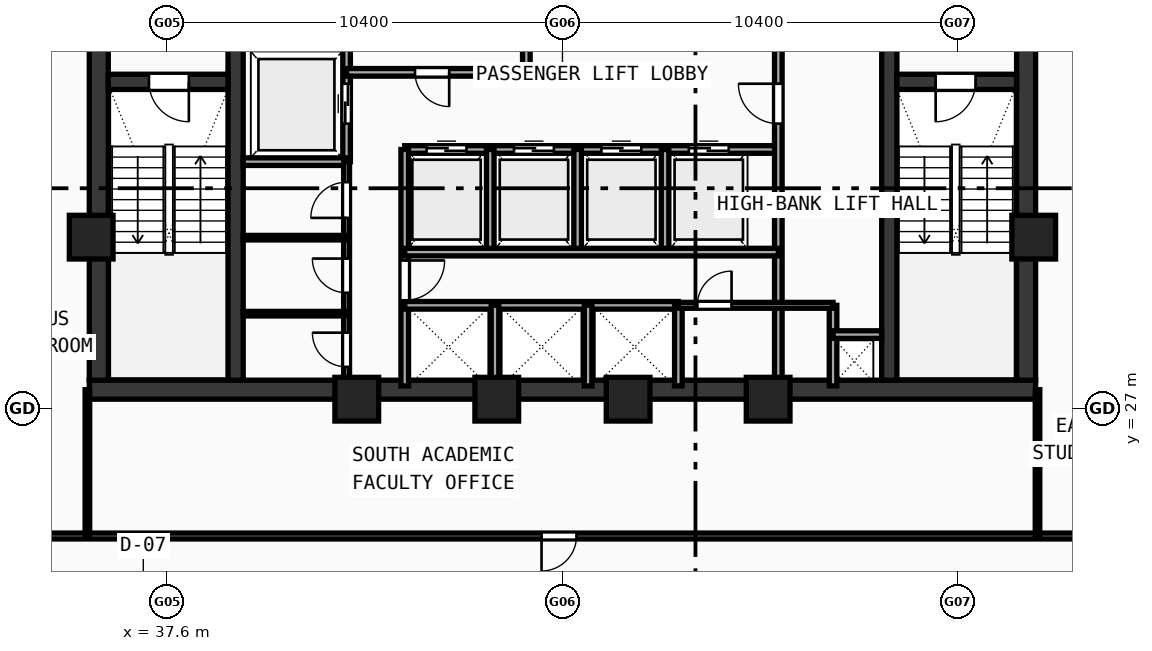
"""IFC4 building model, lengths in metres.
Left out: names, types, materials, properties, quantities, classifications, styles, units other than length and angle.
Written with IfcOpenShell. Run it as: python <this file> out.ifc"""

import sys

from ifc_helpers import new_model, si_unit, direction, frame, frame_2d, origin, origin_with_axes, origin_2d, place, context, subcontext, project, spatial, rectangle, hollow_rectangle, extrude, source, transform, mapped, element, fill, save


model = new_model("IFC4")
c1 = context("Model", 3, precision=1e-05, world=origin(), true_north=direction((0.0, 1.0)))
c2 = subcontext(c1, "Body", "Model", "MODEL_VIEW")
j1 = project(units=[si_unit("LENGTHUNIT", "METRE"), si_unit("PLANEANGLEUNIT", "RADIAN")], contexts=[c1])
p1 = place(None, origin())
s1 = spatial("IfcSite", under=j1, at=p1, CompositionType="ELEMENT")
p2 = place(p1, origin())
s2 = spatial("IfcBuilding", under=s1, at=p2, CompositionType="ELEMENT")
p3 = place(p2, frame((0.0, 0.0, 192.36)))
s3 = spatial("IfcBuildingStorey", under=s2, at=p3, CompositionType="ELEMENT", Elevation=192.36)
p4 = place(p3, frame((35.55, 27.5, 0.0), z_axis=(0.0, 0.0, 1.0), x_axis=(1.0, 0.0, 0.0)))
e1 = element("IfcWall", 1, at=p4, inside=s3, PredefinedType="SHEAR", context=c2, shape_type="SweptSolid", body=[
    extrude(rectangle(XDim=24.9, YDim=0.5, at=frame_2d((12.45, 0.0))), origin(), (0.0, 0.0, 1.0), 3.54),
])
for number, where, z_axis, x_axis in (
    (2, (35.8, 27.75, 0.0), (0.0, 0.0, 1.0), (0.0, 1.0, 0.0)),
    (3, (60.2, 27.75, 0.0), (0.0, 0.0, 1.0), (0.0, 1.0, 0.0)),
):
    element("IfcWall", number, at=place(p3, frame(where, z_axis=z_axis, x_axis=x_axis)), inside=s3, PredefinedType="SHEAR", context=c2, shape_type="SweptSolid", body=[
        extrude(rectangle(XDim=12.2, YDim=0.5, at=frame_2d((6.1, 0.0))), origin(), (0.0, 0.0, 1.0), 3.54),
    ])
p5 = place(p3, frame((39.4, 27.75, 0.0), z_axis=(0.0, 0.0, 1.0), x_axis=(0.0, 1.0, 0.0)))
e4 = element("IfcWall", 4, at=p5, inside=s3, PredefinedType="SHEAR", context=c2, shape_type="SweptSolid", body=[
    extrude(rectangle(XDim=12.2, YDim=0.4, at=frame_2d((6.1, 0.0))), origin(), (0.0, 0.0, 1.0), 3.54),
])
p6 = place(p5, frame((10.0, 0.0, 0.0)))
e5 = element("IfcOpeningElement", 5, at=p6, cuts=e4, PredefinedType="OPENING", context=c2, shape_type="SweptSolid", body=[
    extrude(rectangle(XDim=1.1, YDim=2.1, at=frame_2d((0.55, 1.05))), frame((0.0, 0.21, 0.0), z_axis=(0.0, -1.0, 0.0), x_axis=(1.0, 0.0, 0.0)), (0.0, 0.0, 1.0), 0.42),
])
p7 = place(p3, frame((56.6, 27.75, 0.0), z_axis=(0.0, 0.0, 1.0), x_axis=(0.0, 1.0, 0.0)))
e6 = element("IfcWall", 6, at=p7, inside=s3, PredefinedType="SHEAR", context=c2, shape_type="SweptSolid", body=[
    extrude(rectangle(XDim=12.2, YDim=0.4, at=frame_2d((6.1, 0.0))), origin(), (0.0, 0.0, 1.0), 3.54),
])
p8 = place(p7, frame((10.0, 0.0, 0.0)))
e7 = element("IfcOpeningElement", 7, at=p8, cuts=e6, PredefinedType="OPENING", context=c2, shape_type="SweptSolid", body=[
    extrude(rectangle(XDim=1.1, YDim=2.1, at=frame_2d((0.55, 1.05))), frame((0.0, 0.21, 0.0), z_axis=(0.0, -1.0, 0.0), x_axis=(1.0, 0.0, 0.0)), (0.0, 0.0, 1.0), 0.42),
])
p9 = place(p3, frame((36.05, 35.6, 0.0), z_axis=(0.0, 0.0, 1.0), x_axis=(1.0, 0.0, 0.0)))
e8 = element("IfcWall", 8, at=p9, inside=s3, PredefinedType="SHEAR", context=c2, shape_type="SweptSolid", body=[
    extrude(rectangle(XDim=3.15, YDim=0.4, at=frame_2d((1.575, 0.0))), origin(), (0.0, 0.0, 1.0), 3.54),
])
p10 = place(p9, frame((1.07, 0.0, 0.0)))
e9 = element("IfcOpeningElement", 9, at=p10, cuts=e8, PredefinedType="OPENING", context=c2, shape_type="SweptSolid", body=[
    extrude(rectangle(XDim=1.05, YDim=2.1, at=frame_2d((0.525, 1.05))), frame((0.0, 0.21, 0.0), z_axis=(0.0, -1.0, 0.0), x_axis=(1.0, 0.0, 0.0)), (0.0, 0.0, 1.0), 0.42),
])
p11 = place(p3, frame((56.8, 35.6, 0.0), z_axis=(0.0, 0.0, 1.0), x_axis=(1.0, 0.0, 0.0)))
e10 = element("IfcWall", 10, at=p11, inside=s3, PredefinedType="SHEAR", context=c2, shape_type="SweptSolid", body=[
    extrude(rectangle(XDim=3.15, YDim=0.4, at=frame_2d((1.575, 0.0))), origin(), (0.0, 0.0, 1.0), 3.54),
])
p12 = place(p11, frame((1.02, 0.0, 0.0)))
e11 = element("IfcOpeningElement", 11, at=p12, cuts=e10, PredefinedType="OPENING", context=c2, shape_type="SweptSolid", body=[
    extrude(rectangle(XDim=1.05, YDim=2.1, at=frame_2d((0.525, 1.05))), frame((0.0, 0.21, 0.0), z_axis=(0.0, -1.0, 0.0), x_axis=(1.0, 0.0, 0.0)), (0.0, 0.0, 1.0), 0.42),
])
m1 = source(origin(), c2, "Body", "SweptSolid", [
    extrude(hollow_rectangle(XDim=1.15, YDim=1.15, WallThickness=0.048, at=origin_2d()), origin(), (0.0, 0.0, 1.0), 3.8),
])
for number, where, z_axis, x_axis in (
    (12, (42.588, 27.25, -0.26), (0.0, 0.0, 1.0), (1.0, 0.0, 0.0)),
    (13, (46.272, 27.25, -0.26), (0.0, 0.0, 1.0), (1.0, 0.0, 0.0)),
    (14, (49.729, 27.25, -0.26), (0.0, 0.0, 1.0), (1.0, 0.0, 0.0)),
    (15, (53.412, 27.25, -0.26), (0.0, 0.0, 1.0), (1.0, 0.0, 0.0)),
    (16, (60.4, 31.513, -0.26), (0.0, 0.0, 1.0), (1.0, 0.0, 0.0)),
    (17, (35.6, 31.513, -0.26), (0.0, 0.0, 1.0), (1.0, 0.0, 0.0)),
):
    element("IfcColumn", number, at=place(p3, frame(where, z_axis=z_axis, x_axis=x_axis)), inside=s3, PredefinedType="COLUMN", context=c2, shape_type="MappedRepresentation", body=[
        mapped(m1, transform((0.0, 0.0, 0.0), scale=1.0)),
    ])
p13 = place(p3, frame((42.32, 33.5, 0.0), z_axis=(0.0, 0.0, 1.0), x_axis=(0.0, 1.0, 0.0)))
e18 = element("IfcWall", 18, at=p13, inside=s3, PredefinedType="SOLIDWALL", context=c2, shape_type="SweptSolid", body=[
    extrude(rectangle(XDim=6.45, YDim=0.2, at=frame_2d((3.225, 0.0))), origin(), (0.0, 0.0, 1.0), 3.54),
])
p14 = place(p13, frame((1.0, 0.0, 0.0)))
e19 = element("IfcOpeningElement", 19, at=p14, cuts=e18, PredefinedType="OPENING", context=c2, shape_type="SweptSolid", body=[
    extrude(rectangle(XDim=1.05, YDim=2.1, at=frame_2d((0.525, 1.05))), frame((0.0, 0.11, 0.0), z_axis=(0.0, -1.0, 0.0), x_axis=(1.0, 0.0, 0.0)), (0.0, 0.0, 1.0), 0.22),
])
p15 = place(p3, frame((39.6, 33.5, 0.0), z_axis=(0.0, 0.0, 1.0), x_axis=(1.0, 0.0, 0.0)))
e20 = element("IfcWall", 20, at=p15, inside=s3, PredefinedType="SOLIDWALL", context=c2, shape_type="SweptSolid", body=[
    extrude(rectangle(XDim=2.72, YDim=0.2, at=frame_2d((1.36, 0.0))), origin(), (0.0, 0.0, 1.0), 3.54),
])
p16 = place(p3, frame((42.32, 35.85, 0.0), z_axis=(0.0, 0.0, 1.0), x_axis=(1.0, 0.0, 0.0)))
e21 = element("IfcWall", 21, at=p16, inside=s3, PredefinedType="SOLIDWALL", context=c2, shape_type="SweptSolid", body=[
    extrude(rectangle(XDim=4.73, YDim=0.2, at=frame_2d((2.365, 0.0))), origin(), (0.0, 0.0, 1.0), 3.54),
])
p17 = place(p16, frame((1.8, 0.0, 0.0)))
e22 = element("IfcOpeningElement", 22, at=p17, cuts=e21, PredefinedType="OPENING", context=c2, shape_type="SweptSolid", body=[
    extrude(rectangle(XDim=0.9, YDim=2.1, at=frame_2d((0.45, 1.05))), frame((0.0, 0.11, 0.0), z_axis=(0.0, -1.0, 0.0), x_axis=(1.0, 0.0, 0.0)), (0.0, 0.0, 1.0), 0.22),
])
p18 = place(p3, frame((47.05, 35.85, 0.0), z_axis=(0.0, 0.0, 1.0), x_axis=(0.0, 1.0, 0.0)))
e23 = element("IfcWall", 23, at=p18, inside=s3, PredefinedType="SOLIDWALL", context=c2, shape_type="SweptSolid", body=[
    extrude(rectangle(XDim=4.1, YDim=0.2, at=frame_2d((2.05, 0.0))), origin(), (0.0, 0.0, 1.0), 3.54),
])
p19 = place(p3, frame((43.85, 33.82, 0.0), z_axis=(0.0, 0.0, 1.0), x_axis=(1.0, 0.0, 0.0)))
e24 = element("IfcWall", 24, at=p19, inside=s3, PredefinedType="SOLIDWALL", context=c2, shape_type="SweptSolid", body=[
    extrude(rectangle(XDim=9.83, YDim=0.2, at=frame_2d((4.915, 0.0))), origin(), (0.0, 0.0, 1.0), 3.54),
])
p20 = place(p19, frame((0.575, 0.0, 0.0)))
e25 = element("IfcOpeningElement", 25, at=p20, cuts=e24, PredefinedType="OPENING", context=c2, shape_type="SweptSolid", body=[
    extrude(rectangle(XDim=1.05, YDim=2.1, at=frame_2d((0.525, 1.05))), frame((0.0, 0.11, 0.0), z_axis=(0.0, -1.0, 0.0), x_axis=(1.0, 0.0, 0.0)), (0.0, 0.0, 1.0), 0.22),
])
p21 = place(p19, frame((2.875, 0.0, 0.0)))
e26 = element("IfcOpeningElement", 26, at=p21, cuts=e24, PredefinedType="OPENING", context=c2, shape_type="SweptSolid", body=[
    extrude(rectangle(XDim=1.05, YDim=2.1, at=frame_2d((0.525, 1.05))), frame((0.0, 0.11, 0.0), z_axis=(0.0, -1.0, 0.0), x_axis=(1.0, 0.0, 0.0)), (0.0, 0.0, 1.0), 0.22),
])
p22 = place(p19, frame((5.175, 0.0, 0.0)))
e27 = element("IfcOpeningElement", 27, at=p22, cuts=e24, PredefinedType="OPENING", context=c2, shape_type="SweptSolid", body=[
    extrude(rectangle(XDim=1.05, YDim=2.1, at=frame_2d((0.525, 1.05))), frame((0.0, 0.11, 0.0), z_axis=(0.0, -1.0, 0.0), x_axis=(1.0, 0.0, 0.0)), (0.0, 0.0, 1.0), 0.22),
])
p23 = place(p19, frame((7.475, 0.0, 0.0)))
e28 = element("IfcOpeningElement", 28, at=p23, cuts=e24, PredefinedType="OPENING", context=c2, shape_type="SweptSolid", body=[
    extrude(rectangle(XDim=1.05, YDim=2.1, at=frame_2d((0.525, 1.05))), frame((0.0, 0.11, 0.0), z_axis=(0.0, -1.0, 0.0), x_axis=(1.0, 0.0, 0.0)), (0.0, 0.0, 1.0), 0.22),
])
p24 = place(p3, frame((43.85, 27.6, 0.0), z_axis=(0.0, 0.0, 1.0), x_axis=(0.0, 1.0, 0.0)))
e29 = element("IfcWall", 29, at=p24, inside=s3, PredefinedType="SOLIDWALL", context=c2, shape_type="SweptSolid", body=[
    extrude(rectangle(XDim=6.22, YDim=0.2, at=frame_2d((3.11, 0.0))), origin(), (0.0, 0.0, 1.0), 3.54),
])
p25 = place(p24, frame((2.25, 0.0, 0.0)))
e30 = element("IfcOpeningElement", 30, at=p25, cuts=e29, PredefinedType="OPENING", context=c2, shape_type="SweptSolid", body=[
    extrude(rectangle(XDim=1.05, YDim=2.1, at=frame_2d((0.525, 1.05))), frame((0.0, 0.11, 0.0), z_axis=(0.0, -1.0, 0.0), x_axis=(1.0, 0.0, 0.0)), (0.0, 0.0, 1.0), 0.22),
])
p26 = place(p3, frame((53.68, 27.6, 0.0), z_axis=(0.0, 0.0, 1.0), x_axis=(0.0, 1.0, 0.0)))
e31 = element("IfcWall", 31, at=p26, inside=s3, PredefinedType="SOLIDWALL", context=c2, shape_type="SweptSolid", body=[
    extrude(rectangle(XDim=9.05, YDim=0.2, at=frame_2d((4.525, 0.0))), origin(), (0.0, 0.0, 1.0), 3.54),
])
p27 = place(p26, frame((6.9, 0.0, 0.0)))
e32 = element("IfcOpeningElement", 32, at=p27, cuts=e31, PredefinedType="OPENING", context=c2, shape_type="SweptSolid", body=[
    extrude(rectangle(XDim=1.05, YDim=2.1, at=frame_2d((0.525, 1.05))), frame((0.0, 0.11, 0.0), z_axis=(0.0, -1.0, 0.0), x_axis=(1.0, 0.0, 0.0)), (0.0, 0.0, 1.0), 0.22),
])
for number, where, z_axis, x_axis in (
    (33, (46.1, 31.12, 0.0), (0.0, 0.0, 1.0), (0.0, 1.0, 0.0)),
    (34, (48.4, 31.12, 0.0), (0.0, 0.0, 1.0), (0.0, 1.0, 0.0)),
    (35, (50.7, 31.12, 0.0), (0.0, 0.0, 1.0), (0.0, 1.0, 0.0)),
):
    element("IfcWall", number, at=place(p3, frame(where, z_axis=z_axis, x_axis=x_axis)), inside=s3, PredefinedType="SOLIDWALL", context=c2, shape_type="SweptSolid", body=[
        extrude(rectangle(XDim=2.7, YDim=0.2, at=frame_2d((1.35, 0.0))), origin(), (0.0, 0.0, 1.0), 3.54),
    ])
p28 = place(p3, frame((43.85, 29.72, 0.0), z_axis=(0.0, 0.0, 1.0), x_axis=(1.0, 0.0, 0.0)))
e36 = element("IfcWall", 36, at=p28, inside=s3, PredefinedType="SOLIDWALL", context=c2, shape_type="SweptSolid", body=[
    extrude(rectangle(XDim=7.2, YDim=0.2, at=frame_2d((3.6, 0.0))), origin(), (0.0, 0.0, 1.0), 3.54),
])
p29 = place(p3, frame((51.05, 27.6, 0.0), z_axis=(0.0, 0.0, 1.0), x_axis=(0.0, 1.0, 0.0)))
e37 = element("IfcWall", 37, at=p29, inside=s3, PredefinedType="SOLIDWALL", context=c2, shape_type="SweptSolid", body=[
    extrude(rectangle(XDim=2.12, YDim=0.2, at=frame_2d((1.06, 0.0))), origin(), (0.0, 0.0, 1.0), 3.54),
])
p30 = place(p3, frame((43.85, 31.12, 0.0), z_axis=(0.0, 0.0, 1.0), x_axis=(1.0, 0.0, 0.0)))
e38 = element("IfcWall", 38, at=p30, inside=s3, PredefinedType="SOLIDWALL", context=c2, shape_type="SweptSolid", body=[
    extrude(rectangle(XDim=9.83, YDim=0.2, at=frame_2d((4.915, 0.0))), origin(), (0.0, 0.0, 1.0), 3.54),
])
for number, where, z_axis, x_axis in (
    (39, (46.225, 27.6, 0.0), (0.0, 0.0, 1.0), (0.0, 1.0, 0.0)),
    (40, (48.675, 27.6, 0.0), (0.0, 0.0, 1.0), (0.0, 1.0, 0.0)),
    (41, (55.12, 27.6, 0.0), (0.0, 0.0, 1.0), (0.0, 1.0, 0.0)),
):
    element("IfcWall", number, at=place(p3, frame(where, z_axis=z_axis, x_axis=x_axis)), inside=s3, PredefinedType="SOLIDWALL", context=c2, shape_type="SweptSolid", body=[
        extrude(rectangle(XDim=2.12, YDim=0.2, at=frame_2d((1.06, 0.0))), origin(), (0.0, 0.0, 1.0), 3.54),
    ])
p31 = place(p3, frame((55.12, 28.95, 0.0), z_axis=(0.0, 0.0, 1.0), x_axis=(1.0, 0.0, 0.0)))
e42 = element("IfcWall", 42, at=p31, inside=s3, PredefinedType="SOLIDWALL", context=c2, shape_type="SweptSolid", body=[
    extrude(rectangle(XDim=1.28, YDim=0.2, at=frame_2d((0.64, 0.0))), origin(), (0.0, 0.0, 1.0), 3.54),
])
p32 = place(p3, frame((42.32, 27.6, 0.0), z_axis=(0.0, 0.0, 1.0), x_axis=(0.0, 1.0, 0.0)))
e43 = element("IfcWall", 43, at=p32, inside=s3, PredefinedType="PARTITIONING", context=c2, shape_type="SweptSolid", body=[
    extrude(rectangle(XDim=5.9, YDim=0.155, at=frame_2d((2.95, 0.0))), origin(), (0.0, 0.0, 1.0), 3.54),
])
p33 = place(p32, frame((0.5, 0.0, 0.0)))
e44 = element("IfcOpeningElement", 44, at=p33, cuts=e43, PredefinedType="OPENING", context=c2, shape_type="SweptSolid", body=[
    extrude(rectangle(XDim=0.9, YDim=2.1, at=frame_2d((0.45, 1.05))), frame((0.0, 0.087, 0.0), z_axis=(0.0, -1.0, 0.0), x_axis=(1.0, 0.0, 0.0)), (0.0, 0.0, 1.0), 0.175),
])
p34 = place(p32, frame((2.45, 0.0, 0.0)))
e45 = element("IfcOpeningElement", 45, at=p34, cuts=e43, PredefinedType="OPENING", context=c2, shape_type="SweptSolid", body=[
    extrude(rectangle(XDim=0.9, YDim=2.1, at=frame_2d((0.45, 1.05))), frame((0.0, 0.087, 0.0), z_axis=(0.0, -1.0, 0.0), x_axis=(1.0, 0.0, 0.0)), (0.0, 0.0, 1.0), 0.175),
])
p35 = place(p32, frame((4.42, 0.0, 0.0)))
e46 = element("IfcOpeningElement", 46, at=p35, cuts=e43, PredefinedType="OPENING", context=c2, shape_type="SweptSolid", body=[
    extrude(rectangle(XDim=0.94, YDim=2.1, at=frame_2d((0.47, 1.05))), frame((0.0, 0.087, 0.0), z_axis=(0.0, -1.0, 0.0), x_axis=(1.0, 0.0, 0.0)), (0.0, 0.0, 1.0), 0.175),
])
p36 = place(p3, frame((51.05, 29.72, 0.0), z_axis=(0.0, 0.0, 1.0), x_axis=(1.0, 0.0, 0.0)))
e47 = element("IfcWall", 47, at=p36, inside=s3, PredefinedType="PARTITIONING", context=c2, shape_type="SweptSolid", body=[
    extrude(rectangle(XDim=4.07, YDim=0.155, at=frame_2d((2.035, 0.0))), origin(), (0.0, 0.0, 1.0), 3.54),
])
p37 = place(p36, frame((0.5, 0.0, 0.0)))
e48 = element("IfcOpeningElement", 48, at=p37, cuts=e47, PredefinedType="OPENING", context=c2, shape_type="SweptSolid", body=[
    extrude(rectangle(XDim=0.9, YDim=2.1, at=frame_2d((0.45, 1.05))), frame((0.0, 0.087, 0.0), z_axis=(0.0, -1.0, 0.0), x_axis=(1.0, 0.0, 0.0)), (0.0, 0.0, 1.0), 0.175),
])
for number, where, z_axis, x_axis in (
    (49, (39.6, 29.5, 0.0), (0.0, 0.0, 1.0), (1.0, 0.0, 0.0)),
    (50, (39.6, 31.5, 0.0), (0.0, 0.0, 1.0), (1.0, 0.0, 0.0)),
):
    element("IfcWall", number, at=place(p3, frame(where, z_axis=z_axis, x_axis=x_axis)), inside=s3, PredefinedType="PARTITIONING", context=c2, shape_type="SweptSolid", body=[
        extrude(rectangle(XDim=2.72, YDim=0.12, at=frame_2d((1.36, 0.0))), origin(), (0.0, 0.0, 1.0), 3.54),
    ])
p38 = place(p3, frame((31.45, 23.65, 0.0), z_axis=(0.0, 0.0, 1.0), x_axis=(1.0, 0.0, 0.0)))
e51 = element("IfcWall", 51, at=p38, inside=s3, PredefinedType="PARTITIONING", context=c2, shape_type="SweptSolid", body=[
    extrude(rectangle(XDim=33.1, YDim=0.155, at=frame_2d((16.55, 0.0))), origin(), (0.0, 0.0, 1.0), 2.89),
])
p39 = place(p38, frame((16.0, 0.0, 0.0)))
e52 = element("IfcOpeningElement", 52, at=p39, cuts=e51, PredefinedType="OPENING", context=c2, shape_type="SweptSolid", body=[
    extrude(rectangle(XDim=0.92, YDim=2.1, at=frame_2d((0.46, 1.05))), frame((0.0, 0.087, 0.0), z_axis=(0.0, -1.0, 0.0), x_axis=(1.0, 0.0, 0.0)), (0.0, 0.0, 1.0), 0.175),
])
for number, where, z_axis, x_axis in (
    (53, (35.5, 23.65, 0.0), (0.0, 0.0, 1.0), (0.0, 1.0, 0.0)),
    (54, (60.5, 23.65, 0.0), (0.0, 0.0, 1.0), (0.0, 1.0, 0.0)),
):
    element("IfcWall", number, at=place(p3, frame(where, z_axis=z_axis, x_axis=x_axis)), inside=s3, PredefinedType="PARTITIONING", context=c2, shape_type="SweptSolid", body=[
        extrude(rectangle(XDim=3.85, YDim=0.12, at=frame_2d((1.925, 0.0))), origin(), (0.0, 0.0, 1.0), 3.14),
    ])
m2 = source(origin(), c2, "Body", "SweptSolid", [
    extrude(rectangle(XDim=1.05, YDim=2.1, at=frame_2d((0.525, 1.05))), frame((0.0, 0.025, 0.0), z_axis=(0.0, -1.0, 0.0), x_axis=(1.0, 0.0, 0.0)), (0.0, 0.0, 1.0), 0.05),
])
p40 = place(p10, frame((1.05, 0.0, 0.0), z_axis=(0.0, 0.0, 1.0), x_axis=(-1.0, 0.0, 0.0)))
e55 = element("IfcDoor", 55, at=p40, inside=s3, OperationType="SINGLE_SWING_LEFT", PredefinedType="DOOR", context=c2, shape_type="MappedRepresentation", body=[
    mapped(m2, transform((0.0, 0.0, 0.0), scale=1.0)),
])
fill(e9, e55)
p41 = place(p12, frame((1.05, 0.0, 0.0), z_axis=(0.0, 0.0, 1.0), x_axis=(-1.0, 0.0, 0.0)))
e56 = element("IfcDoor", 56, at=p41, inside=s3, OperationType="SINGLE_SWING_RIGHT", PredefinedType="DOOR", context=c2, shape_type="MappedRepresentation", body=[
    mapped(m2, transform((0.0, 0.0, 0.0), scale=1.0)),
])
fill(e11, e56)
p42 = place(p14, origin_with_axes())
e57 = element("IfcDoor", 57, at=p42, inside=s3, OperationType="DOUBLE_DOOR_SLIDING", PredefinedType="DOOR", context=c2, shape_type="MappedRepresentation", body=[
    mapped(m2, transform((0.0, 0.0, 0.0), scale=1.0)),
])
fill(e19, e57)
m3 = source(origin(), c2, "Body", "SweptSolid", [
    extrude(rectangle(XDim=0.9, YDim=2.1, at=frame_2d((0.45, 1.05))), frame((0.0, 0.025, 0.0), z_axis=(0.0, -1.0, 0.0), x_axis=(1.0, 0.0, 0.0)), (0.0, 0.0, 1.0), 0.05),
])
p43 = place(p17, frame((0.9, 0.0, 0.0), z_axis=(0.0, 0.0, 1.0), x_axis=(-1.0, 0.0, 0.0)))
e58 = element("IfcDoor", 58, at=p43, inside=s3, OperationType="SINGLE_SWING_LEFT", PredefinedType="DOOR", context=c2, shape_type="MappedRepresentation", body=[
    mapped(m3, transform((0.0, 0.0, 0.0), scale=1.0)),
])
fill(e22, e58)
p44 = place(p20, origin_with_axes())
e59 = element("IfcDoor", 59, at=p44, inside=s3, OperationType="DOUBLE_DOOR_SLIDING", PredefinedType="DOOR", context=c2, shape_type="MappedRepresentation", body=[
    mapped(m2, transform((0.0, 0.0, 0.0), scale=1.0)),
])
fill(e25, e59)
p45 = place(p21, origin_with_axes())
e60 = element("IfcDoor", 60, at=p45, inside=s3, OperationType="DOUBLE_DOOR_SLIDING", PredefinedType="DOOR", context=c2, shape_type="MappedRepresentation", body=[
    mapped(m2, transform((0.0, 0.0, 0.0), scale=1.0)),
])
fill(e26, e60)
p46 = place(p22, origin_with_axes())
e61 = element("IfcDoor", 61, at=p46, inside=s3, OperationType="DOUBLE_DOOR_SLIDING", PredefinedType="DOOR", context=c2, shape_type="MappedRepresentation", body=[
    mapped(m2, transform((0.0, 0.0, 0.0), scale=1.0)),
])
fill(e27, e61)
p47 = place(p23, origin_with_axes())
e62 = element("IfcDoor", 62, at=p47, inside=s3, OperationType="DOUBLE_DOOR_SLIDING", PredefinedType="DOOR", context=c2, shape_type="MappedRepresentation", body=[
    mapped(m2, transform((0.0, 0.0, 0.0), scale=1.0)),
])
fill(e28, e62)
p48 = place(p25, frame((1.05, 0.0, 0.0), z_axis=(0.0, 0.0, 1.0), x_axis=(-1.0, 0.0, 0.0)))
e63 = element("IfcDoor", 63, at=p48, inside=s3, OperationType="SINGLE_SWING_LEFT", PredefinedType="DOOR", context=c2, shape_type="MappedRepresentation", body=[
    mapped(m2, transform((0.0, 0.0, 0.0), scale=1.0)),
])
fill(e30, e63)
p49 = place(p27, origin_with_axes())
e64 = element("IfcDoor", 64, at=p49, inside=s3, OperationType="SINGLE_SWING_RIGHT", PredefinedType="DOOR", context=c2, shape_type="MappedRepresentation", body=[
    mapped(m2, transform((0.0, 0.0, 0.0), scale=1.0)),
])
fill(e32, e64)
p50 = place(p33, origin_with_axes())
e65 = element("IfcDoor", 65, at=p50, inside=s3, OperationType="SINGLE_SWING_RIGHT", PredefinedType="DOOR", context=c2, shape_type="MappedRepresentation", body=[
    mapped(m3, transform((0.0, 0.0, 0.0), scale=1.0)),
])
fill(e44, e65)
p51 = place(p34, origin_with_axes())
e66 = element("IfcDoor", 66, at=p51, inside=s3, OperationType="SINGLE_SWING_RIGHT", PredefinedType="DOOR", context=c2, shape_type="MappedRepresentation", body=[
    mapped(m3, transform((0.0, 0.0, 0.0), scale=1.0)),
])
fill(e45, e66)
m4 = source(origin(), c2, "Body", "SweptSolid", [
    extrude(rectangle(XDim=0.94, YDim=2.1, at=frame_2d((0.47, 1.05))), frame((0.0, 0.025, 0.0), z_axis=(0.0, -1.0, 0.0), x_axis=(1.0, 0.0, 0.0)), (0.0, 0.0, 1.0), 0.05),
])
p52 = place(p35, origin_with_axes())
e67 = element("IfcDoor", 67, at=p52, inside=s3, OperationType="SINGLE_SWING_LEFT", PredefinedType="DOOR", context=c2, shape_type="MappedRepresentation", body=[
    mapped(m4, transform((0.0, 0.0, 0.0), scale=1.0)),
])
fill(e46, e67)
p53 = place(p37, origin_with_axes())
e68 = element("IfcDoor", 68, at=p53, inside=s3, OperationType="SINGLE_SWING_RIGHT", PredefinedType="DOOR", context=c2, shape_type="MappedRepresentation", body=[
    mapped(m3, transform((0.0, 0.0, 0.0), scale=1.0)),
])
fill(e48, e68)
m5 = source(origin(), c2, "Body", "SweptSolid", [
    extrude(rectangle(XDim=0.92, YDim=2.1, at=frame_2d((0.46, 1.05))), frame((0.0, 0.025, 0.0), z_axis=(0.0, -1.0, 0.0), x_axis=(1.0, 0.0, 0.0)), (0.0, 0.0, 1.0), 0.05),
])
p54 = place(p39, frame((0.92, 0.0, 0.0), z_axis=(0.0, 0.0, 1.0), x_axis=(-1.0, 0.0, 0.0)))
e69 = element("IfcDoor", 69, at=p54, inside=s3, OperationType="SINGLE_SWING_RIGHT", PredefinedType="DOOR", context=c2, shape_type="MappedRepresentation", body=[
    mapped(m5, transform((0.0, 0.0, 0.0), scale=1.0)),
])
fill(e52, e69)
save(model, sys.argv[1])
